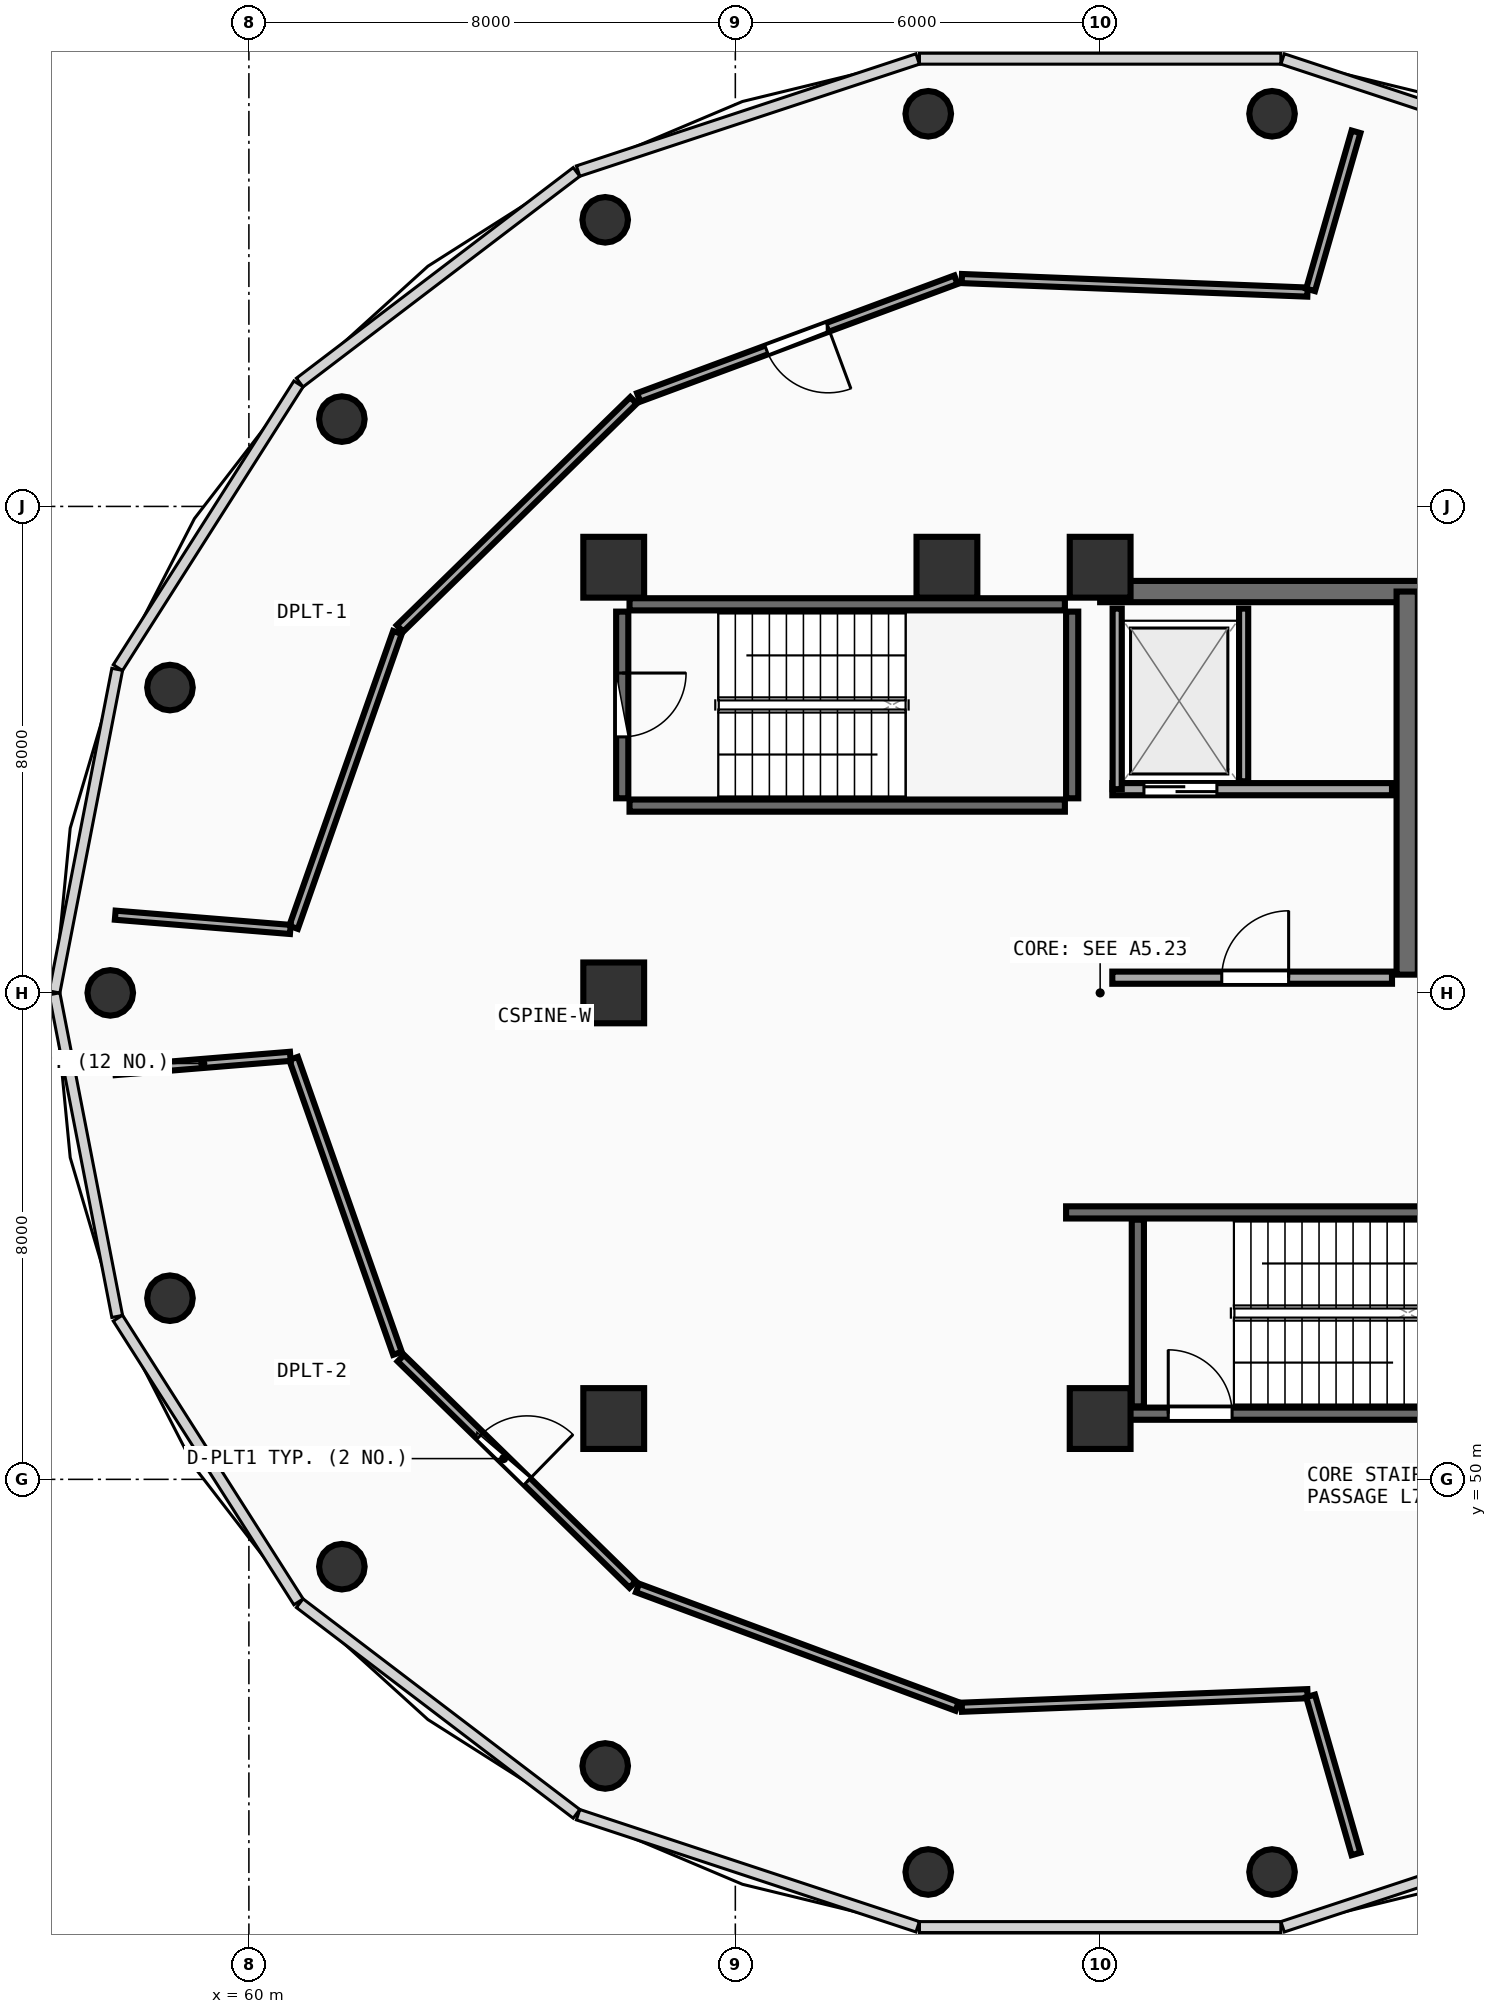
"""IFC4 building model, lengths in metres.
Left out: names, types, materials, properties, quantities, classifications, styles, units other than length and angle.
Written with IfcOpenShell. Run it as: python <this file> out.ifc"""

import sys

from ifc_helpers import new_model, si_unit, direction, frame, frame_2d, origin, origin_2d, place, context, subcontext, project, spatial, rectangle, circle, extrude, element, fill, save


model = new_model("IFC4")
c1 = context("Model", 3, precision=1e-05, world=origin(), true_north=direction((0.0, 1.0)))
c2 = subcontext(c1, "Body", "Model", "MODEL_VIEW")
j1 = project(units=[si_unit("LENGTHUNIT", "METRE"), si_unit("PLANEANGLEUNIT", "RADIAN")], contexts=[c1])
p1 = place(None, origin())
s1 = spatial("IfcSite", under=j1, at=p1, CompositionType="ELEMENT")
p2 = place(p1, origin())
s2 = spatial("IfcBuilding", under=s1, at=p2, CompositionType="ELEMENT")
p3 = place(p2, frame((0.0, 0.0, 302.7)))
s3 = spatial("IfcBuildingStorey", under=s2, at=p3, CompositionType="ELEMENT", Elevation=302.7)
for number, where, z_axis, x_axis in (
    (1, (66.0, 51.0, 0.0), (0.0, 0.0, 1.0), (1.0, 0.0, 0.0)),
    (2, (74.0, 51.0, 0.0), (0.0, 0.0, 1.0), (1.0, 0.0, 0.0)),
    (3, (74.0, 65.0, 0.0), (0.0, 0.0, 1.0), (1.0, 0.0, 0.0)),
    (4, (71.48, 65.0, 0.0), (0.0, 0.0, 1.0), (1.0, 0.0, 0.0)),
    (5, (66.0, 65.0, 0.0), (0.0, 0.0, 1.0), (1.0, 0.0, 0.0)),
    (6, (66.0, 58.0, 0.0), (0.0, 0.0, 1.0), (1.0, 0.0, 0.0)),
):
    element("IfcColumn", number, at=place(p3, frame(where, z_axis=z_axis, x_axis=x_axis)), inside=s3, PredefinedType="PILASTER", context=c2, shape_type="SweptSolid", body=[
        extrude(rectangle(XDim=1.0, YDim=1.0, at=origin_2d()), origin(), (0.0, 0.0, 1.0), 4.2),
    ])
for number, where, z_axis, x_axis in (
    (7, (76.827, 72.457, 0.0), (0.0, 0.0, 1.0), (1.0, 0.0, 0.0)),
    (8, (71.173, 72.457, 0.0), (0.0, 0.0, 1.0), (1.0, 0.0, 0.0)),
    (9, (65.86, 70.713, 0.0), (0.0, 0.0, 1.0), (1.0, 0.0, 0.0)),
    (10, (61.529, 67.436, 0.0), (0.0, 0.0, 1.0), (1.0, 0.0, 0.0)),
    (11, (58.702, 63.021, 0.0), (0.0, 0.0, 1.0), (1.0, 0.0, 0.0)),
    (12, (57.72, 58.0, 0.0), (0.0, 0.0, 1.0), (1.0, 0.0, 0.0)),
    (13, (58.702, 52.979, 0.0), (0.0, 0.0, 1.0), (1.0, 0.0, 0.0)),
    (14, (61.529, 48.564, 0.0), (0.0, 0.0, 1.0), (1.0, 0.0, 0.0)),
    (15, (65.86, 45.287, 0.0), (0.0, 0.0, 1.0), (1.0, 0.0, 0.0)),
    (16, (71.173, 43.543, 0.0), (0.0, 0.0, 1.0), (1.0, 0.0, 0.0)),
    (17, (76.827, 43.543, 0.0), (0.0, 0.0, 1.0), (1.0, 0.0, 0.0)),
):
    element("IfcColumn", number, at=place(p3, frame(where, z_axis=z_axis, x_axis=x_axis)), inside=s3, PredefinedType="COLUMN", context=c2, shape_type="SweptSolid", body=[
        extrude(circle(Radius=0.375, at=origin_2d()), origin(), (0.0, 0.0, 1.0), 4.2),
    ])
p4 = place(p3, frame((66.26, 61.08, 0.0), z_axis=(0.0, 0.0, 1.0), x_axis=(1.0, 0.0, 0.0)))
e18 = element("IfcWall", 18, at=p4, inside=s3, PredefinedType="SHEAR", context=c2, shape_type="SweptSolid", body=[
    extrude(rectangle(XDim=7.16, YDim=0.2, at=frame_2d((3.58, 0.0))), origin(), (0.0, 0.0, 1.0), 3.94),
])
p5 = place(p3, frame((73.54, 61.2, 0.0), z_axis=(0.0, 0.0, 1.0), x_axis=(0.0, 1.0, 0.0)))
e19 = element("IfcWall", 19, at=p5, inside=s3, PredefinedType="SHEAR", context=c2, shape_type="SweptSolid", body=[
    extrude(rectangle(XDim=3.07, YDim=0.2, at=frame_2d((1.535, 0.0))), origin(), (0.0, 0.0, 1.0), 3.94),
])
p6 = place(p3, frame((73.42, 64.39, 0.0), z_axis=(0.0, 0.0, 1.0), x_axis=(-1.0, 0.0, 0.0)))
e20 = element("IfcWall", 20, at=p6, inside=s3, PredefinedType="SHEAR", context=c2, shape_type="SweptSolid", body=[
    extrude(rectangle(XDim=7.16, YDim=0.2, at=frame_2d((3.58, 0.0))), origin(), (0.0, 0.0, 1.0), 3.94),
])
p7 = place(p3, frame((66.14, 64.27, 0.0), z_axis=(0.0, 0.0, 1.0), x_axis=(0.0, -1.0, 0.0)))
e21 = element("IfcWall", 21, at=p7, inside=s3, PredefinedType="SHEAR", context=c2, shape_type="SweptSolid", body=[
    extrude(rectangle(XDim=3.07, YDim=0.2, at=frame_2d((1.535, 0.0))), origin(), (0.0, 0.0, 1.0), 3.94),
])
p8 = place(p7, frame((1.01, 0.0, 0.0)))
e22 = element("IfcOpeningElement", 22, at=p8, cuts=e21, PredefinedType="OPENING", context=c2, shape_type="SweptSolid", body=[
    extrude(rectangle(XDim=1.05, YDim=2.1, at=frame_2d((0.525, 1.05))), frame((0.0, 0.11, 0.0), z_axis=(0.0, -1.0, 0.0), x_axis=(1.0, 0.0, 0.0)), (0.0, 0.0, 1.0), 0.22),
])
p9 = place(p3, frame((74.0, 51.08, 0.0), z_axis=(0.0, 0.0, 1.0), x_axis=(1.0, 0.0, 0.0)))
e23 = element("IfcWall", 23, at=p9, inside=s3, PredefinedType="SHEAR", context=c2, shape_type="SweptSolid", body=[
    extrude(rectangle(XDim=7.9, YDim=0.2, at=frame_2d((3.95, 0.0))), origin(), (0.0, 0.0, 1.0), 3.94),
])
p10 = place(p9, frame((1.12, 0.0, 0.0)))
e24 = element("IfcOpeningElement", 24, at=p10, cuts=e23, PredefinedType="OPENING", context=c2, shape_type="SweptSolid", body=[
    extrude(rectangle(XDim=1.05, YDim=2.1, at=frame_2d((0.525, 1.05))), frame((0.0, 0.11, 0.0), z_axis=(0.0, -1.0, 0.0), x_axis=(1.0, 0.0, 0.0)), (0.0, 0.0, 1.0), 0.22),
])
p11 = place(p3, frame((81.9, 54.39, 0.0), z_axis=(0.0, 0.0, 1.0), x_axis=(-1.0, 0.0, 0.0)))
e25 = element("IfcWall", 25, at=p11, inside=s3, PredefinedType="SHEAR", context=c2, shape_type="SweptSolid", body=[
    extrude(rectangle(XDim=8.46, YDim=0.2, at=frame_2d((4.23, 0.0))), origin(), (0.0, 0.0, 1.0), 3.94),
])
p12 = place(p3, frame((74.62, 54.27, 0.0), z_axis=(0.0, 0.0, 1.0), x_axis=(0.0, -1.0, 0.0)))
e26 = element("IfcWall", 26, at=p12, inside=s3, PredefinedType="SHEAR", context=c2, shape_type="SweptSolid", body=[
    extrude(rectangle(XDim=3.07, YDim=0.2, at=frame_2d((1.535, 0.0))), origin(), (0.0, 0.0, 1.0), 3.94),
])
p13 = place(p3, frame((74.0, 64.6, 0.0), z_axis=(0.0, 0.0, 1.0), x_axis=(1.0, 0.0, 0.0)))
e27 = element("IfcWall", 27, at=p13, inside=s3, PredefinedType="SHEAR", context=c2, shape_type="SweptSolid", body=[
    extrude(rectangle(XDim=8.0, YDim=0.35, at=frame_2d((4.0, 0.0))), origin(), (0.0, 0.0, 1.0), 3.94),
])
p14 = place(p3, frame((79.05, 58.3, 0.0), z_axis=(0.0, 0.0, 1.0), x_axis=(0.0, 1.0, 0.0)))
e28 = element("IfcWall", 28, at=p14, inside=s3, PredefinedType="SHEAR", context=c2, shape_type="SweptSolid", body=[
    extrude(rectangle(XDim=6.3, YDim=0.35, at=frame_2d((3.15, 0.0))), origin(), (0.0, 0.0, 1.0), 3.94),
])
p15 = place(p3, frame((74.2, 61.35, 0.0), z_axis=(0.0, 0.0, 1.0), x_axis=(1.0, 0.0, 0.0)))
e29 = element("IfcWall", 29, at=p15, inside=s3, PredefinedType="SOLIDWALL", context=c2, shape_type="SweptSolid", body=[
    extrude(rectangle(XDim=4.6, YDim=0.2, at=frame_2d((2.3, 0.0))), origin(), (0.0, 0.0, 1.0), 3.93),
])
p16 = place(p15, frame((0.52, 0.0, 0.0)))
e30 = element("IfcOpeningElement", 30, at=p16, cuts=e29, PredefinedType="OPENING", context=c2, shape_type="SweptSolid", body=[
    extrude(rectangle(XDim=1.2, YDim=2.15, at=frame_2d((0.6, 1.075))), frame((0.0, 0.11, 0.0), z_axis=(0.0, -1.0, 0.0), x_axis=(1.0, 0.0, 0.0)), (0.0, 0.0, 1.0), 0.22),
])
p17 = place(p3, frame((74.28, 61.35, 0.0), z_axis=(0.0, 0.0, 1.0), x_axis=(0.0, 1.0, 0.0)))
e31 = element("IfcWall", 31, at=p17, inside=s3, PredefinedType="PARTITIONING", context=c2, shape_type="SweptSolid", body=[
    extrude(rectangle(XDim=2.97, YDim=0.15, at=frame_2d((1.485, 0.0))), origin(), (0.0, 0.0, 1.0), 3.93),
])
p18 = place(p3, frame((76.36, 61.48, 0.0), z_axis=(0.0, 0.0, 1.0), x_axis=(0.0, 1.0, 0.0)))
e32 = element("IfcWall", 32, at=p18, inside=s3, PredefinedType="PARTITIONING", context=c2, shape_type="SweptSolid", body=[
    extrude(rectangle(XDim=2.84, YDim=0.15, at=frame_2d((1.42, 0.0))), origin(), (0.0, 0.0, 1.0), 3.93),
])
p19 = place(p3, frame((74.2, 58.25, 0.0), z_axis=(0.0, 0.0, 1.0), x_axis=(1.0, 0.0, 0.0)))
e33 = element("IfcWall", 33, at=p19, inside=s3, PredefinedType="SOLIDWALL", context=c2, shape_type="SweptSolid", body=[
    extrude(rectangle(XDim=4.6, YDim=0.2, at=frame_2d((2.3, 0.0))), origin(), (0.0, 0.0, 1.0), 3.93),
])
p20 = place(p19, frame((1.8, 0.0, 0.0)))
e34 = element("IfcOpeningElement", 34, at=p20, cuts=e33, PredefinedType="OPENING", context=c2, shape_type="SweptSolid", body=[
    extrude(rectangle(XDim=1.1, YDim=2.1, at=frame_2d((0.55, 1.05))), frame((0.0, 0.11, 0.0), z_axis=(0.0, -1.0, 0.0), x_axis=(1.0, 0.0, 0.0)), (0.0, 0.0, 1.0), 0.22),
])
p21 = place(p3, frame((71.629, 69.728, 0.0), z_axis=(0.0, 0.0, 1.0), x_axis=(-0.937610047719, -0.34768865155, 0.0)))
e35 = element("IfcWall", 35, at=p21, inside=s3, PredefinedType="PARTITIONING", context=c2, shape_type="SweptSolid", body=[
    extrude(rectangle(XDim=5.565, YDim=0.15, at=frame_2d((2.783, 0.0))), origin(), (0.0, 0.0, 1.0), 3.525),
])
p22 = place(p21, frame((2.243, 0.0, 0.0)))
e36 = element("IfcOpeningElement", 36, at=p22, cuts=e35, PredefinedType="OPENING", context=c2, shape_type="SweptSolid", body=[
    extrude(rectangle(XDim=1.08, YDim=2.1, at=frame_2d((0.54, 1.05))), frame((0.0, 0.085, 0.0), z_axis=(0.0, -1.0, 0.0), x_axis=(1.0, 0.0, 0.0)), (0.0, 0.0, 1.0), 0.17),
])
p23 = place(p3, frame((62.499, 51.993, 0.0), z_axis=(0.0, 0.0, 1.0), x_axis=(0.71541878573, -0.698695900249, 0.0)))
e37 = element("IfcWall", 37, at=p23, inside=s3, PredefinedType="PARTITIONING", context=c2, shape_type="SweptSolid", body=[
    extrude(rectangle(XDim=5.329, YDim=0.15, at=frame_2d((2.664, 0.0))), origin(), (0.0, 0.0, 1.0), 3.525),
])
p24 = place(p23, frame((1.824, 0.0, 0.0)))
e38 = element("IfcOpeningElement", 38, at=p24, cuts=e37, PredefinedType="OPENING", context=c2, shape_type="SweptSolid", body=[
    extrude(rectangle(XDim=1.08, YDim=2.1, at=frame_2d((0.54, 1.05))), frame((0.0, 0.085, 0.0), z_axis=(0.0, -1.0, 0.0), x_axis=(1.0, 0.0, 0.0)), (0.0, 0.0, 1.0), 0.17),
])
p25 = place(p3, frame((77.41, 69.525, 0.0), z_axis=(0.0, 0.0, 1.0), x_axis=(-0.999233860457, 0.03913683834, 0.0)))
e39 = element("IfcWall", 39, at=p25, inside=s3, PredefinedType="PARTITIONING", context=c2, shape_type="SweptSolid", body=[
    extrude(rectangle(XDim=5.689, YDim=0.15, at=frame_2d((2.845, 0.0))), origin(), (0.0, 0.0, 1.0), 3.525),
])
p26 = place(p3, frame((66.325, 67.744, 0.0), z_axis=(0.0, 0.0, 1.0), x_axis=(-0.715402081333, -0.698713004047, 0.0)))
e40 = element("IfcWall", 40, at=p26, inside=s3, PredefinedType="PARTITIONING", context=c2, shape_type="SweptSolid", body=[
    extrude(rectangle(XDim=5.369, YDim=0.15, at=frame_2d((2.684, 0.0))), origin(), (0.0, 0.0, 1.0), 3.525),
])
p27 = place(p3, frame((62.443, 63.927, 0.0), z_axis=(0.0, 0.0, 1.0), x_axis=(-0.332236382146, -0.943196154773, 0.0)))
e41 = element("IfcWall", 41, at=p27, inside=s3, PredefinedType="PARTITIONING", context=c2, shape_type="SweptSolid", body=[
    extrude(rectangle(XDim=5.142, YDim=0.15, at=frame_2d((2.571, 0.0))), origin(), (0.0, 0.0, 1.0), 3.525),
])
p28 = place(p3, frame((60.681, 59.043, 0.0), z_axis=(0.0, 0.0, 1.0), x_axis=(-0.996696214814, 0.081219796696, 0.0)))
e42 = element("IfcWall", 42, at=p28, inside=s3, PredefinedType="PARTITIONING", context=c2, shape_type="SweptSolid", body=[
    extrude(rectangle(XDim=2.889, YDim=0.15, at=frame_2d((1.444, 0.0))), origin(), (0.0, 0.0, 1.0), 3.525),
])
p29 = place(p3, frame((78.208, 72.161, 0.0), z_axis=(0.0, 0.0, 1.0), x_axis=(-0.276223004297, -0.961093570833, 0.0)))
e43 = element("IfcWall", 43, at=p29, inside=s3, PredefinedType="PARTITIONING", context=c2, shape_type="SweptSolid", body=[
    extrude(rectangle(XDim=2.705, YDim=0.15, at=frame_2d((1.352, 0.0))), origin(), (0.0, 0.0, 1.0), 3.525),
])
p30 = place(p3, frame((60.734, 56.922, 0.0), z_axis=(0.0, 0.0, 1.0), x_axis=(0.332236382146, -0.943196154773, 0.0)))
e44 = element("IfcWall", 44, at=p30, inside=s3, PredefinedType="PARTITIONING", context=c2, shape_type="SweptSolid", body=[
    extrude(rectangle(XDim=5.142, YDim=0.15, at=frame_2d((2.571, 0.0))), origin(), (0.0, 0.0, 1.0), 3.525),
])
p31 = place(p3, frame((66.392, 48.214, 0.0), z_axis=(0.0, 0.0, 1.0), x_axis=(0.937597367655, -0.347722843894, 0.0)))
e45 = element("IfcWall", 45, at=p31, inside=s3, PredefinedType="PARTITIONING", context=c2, shape_type="SweptSolid", body=[
    extrude(rectangle(XDim=5.606, YDim=0.15, at=frame_2d((2.803, 0.0))), origin(), (0.0, 0.0, 1.0), 3.625),
])
p32 = place(p3, frame((71.725, 46.253, 0.0), z_axis=(0.0, 0.0, 1.0), x_axis=(0.999233860457, 0.03913683834, 0.0)))
e46 = element("IfcWall", 46, at=p32, inside=s3, PredefinedType="PARTITIONING", context=c2, shape_type="SweptSolid", body=[
    extrude(rectangle(XDim=5.689, YDim=0.15, at=frame_2d((2.845, 0.0))), origin(), (0.0, 0.0, 1.0), 3.525),
])
p33 = place(p3, frame((77.461, 46.439, 0.0), z_axis=(0.0, 0.0, 1.0), x_axis=(0.276223004297, -0.961093570833, 0.0)))
e47 = element("IfcWall", 47, at=p33, inside=s3, PredefinedType="PARTITIONING", context=c2, shape_type="SweptSolid", body=[
    extrude(rectangle(XDim=2.705, YDim=0.15, at=frame_2d((1.352, 0.0))), origin(), (0.0, 0.0, 1.0), 3.525),
])
p34 = place(p3, frame((57.802, 56.722, 0.0), z_axis=(0.0, 0.0, 1.0), x_axis=(0.996696214814, 0.081219796696, 0.0)))
e48 = element("IfcWall", 48, at=p34, inside=s3, PredefinedType="PARTITIONING", context=c2, shape_type="SweptSolid", body=[
    extrude(rectangle(XDim=2.889, YDim=0.15, at=frame_2d((1.444, 0.0))), origin(), (0.0, 0.0, 1.0), 3.525),
])
p35 = place(p8, origin())
e49 = element("IfcDoor", 49, at=p35, inside=s3, OperationType="SINGLE_SWING_LEFT", PredefinedType="DOOR", context=c2, shape_type="SweptSolid", body=[
    extrude(rectangle(XDim=1.05, YDim=2.1, at=frame_2d((0.525, 1.05))), frame((0.0, 0.025, 0.0), z_axis=(0.0, -1.0, 0.0), x_axis=(1.0, 0.0, 0.0)), (0.0, 0.0, 1.0), 0.05),
])
fill(e22, e49)
p36 = place(p10, origin())
e50 = element("IfcDoor", 50, at=p36, inside=s3, OperationType="SINGLE_SWING_LEFT", PredefinedType="DOOR", context=c2, shape_type="SweptSolid", body=[
    extrude(rectangle(XDim=1.05, YDim=2.1, at=frame_2d((0.525, 1.05))), frame((0.0, 0.025, 0.0), z_axis=(0.0, -1.0, 0.0), x_axis=(1.0, 0.0, 0.0)), (0.0, 0.0, 1.0), 0.05),
])
fill(e24, e50)
p37 = place(p16, origin())
e51 = element("IfcDoor", 51, at=p37, inside=s3, OperationType="DOUBLE_DOOR_SLIDING", PredefinedType="DOOR", context=c2, shape_type="SweptSolid", body=[
    extrude(rectangle(XDim=1.2, YDim=2.15, at=frame_2d((0.6, 1.075))), frame((0.0, 0.025, 0.0), z_axis=(0.0, -1.0, 0.0), x_axis=(1.0, 0.0, 0.0)), (0.0, 0.0, 1.0), 0.05),
])
fill(e30, e51)
p38 = place(p20, frame((1.1, 0.0, 0.0), z_axis=(0.0, 0.0, 1.0), x_axis=(-1.0, 0.0, 0.0)))
e52 = element("IfcDoor", 52, at=p38, inside=s3, OperationType="SINGLE_SWING_LEFT", PredefinedType="DOOR", context=c2, shape_type="SweptSolid", body=[
    extrude(rectangle(XDim=1.1, YDim=2.1, at=frame_2d((0.55, 1.05))), frame((0.0, 0.025, 0.0), z_axis=(0.0, -1.0, 0.0), x_axis=(1.0, 0.0, 0.0)), (0.0, 0.0, 1.0), 0.05),
])
fill(e34, e52)
p39 = place(p22, origin())
e53 = element("IfcDoor", 53, at=p39, inside=s3, OperationType="SINGLE_SWING_LEFT", PredefinedType="DOOR", context=c2, shape_type="SweptSolid", body=[
    extrude(rectangle(XDim=1.08, YDim=2.1, at=frame_2d((0.54, 1.05))), frame((0.0, 0.025, 0.0), z_axis=(0.0, -1.0, 0.0), x_axis=(1.0, 0.0, 0.0)), (0.0, 0.0, 1.0), 0.05),
])
fill(e36, e53)
p40 = place(p24, origin())
e54 = element("IfcDoor", 54, at=p40, inside=s3, OperationType="SINGLE_SWING_RIGHT", PredefinedType="DOOR", context=c2, shape_type="SweptSolid", body=[
    extrude(rectangle(XDim=1.08, YDim=2.1, at=frame_2d((0.54, 1.05))), frame((0.0, 0.025, 0.0), z_axis=(0.0, -1.0, 0.0), x_axis=(1.0, 0.0, 0.0)), (0.0, 0.0, 1.0), 0.05),
])
fill(e38, e54)
save(model, sys.argv[1])
